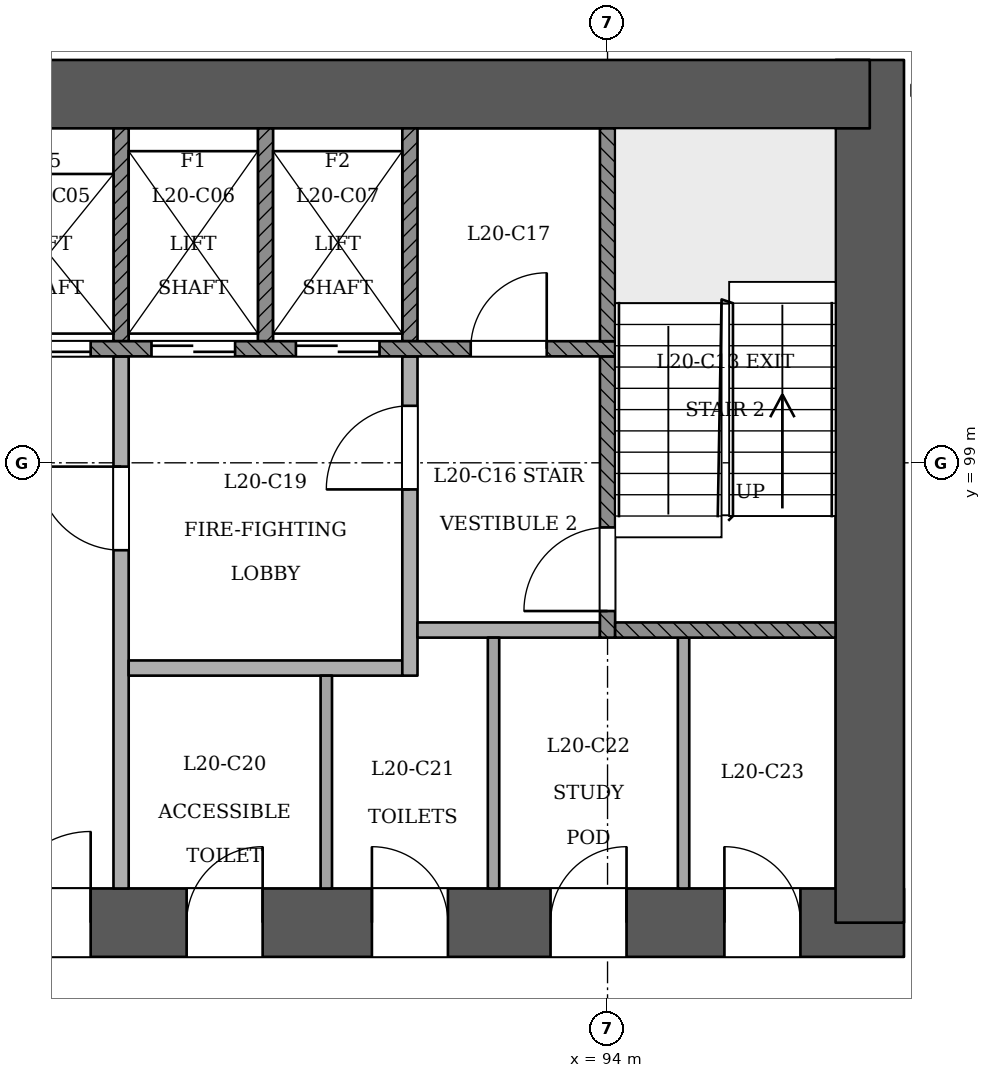
"""IFC4 building model, lengths in metres.
Left out: names, types, materials, properties, quantities, classifications, styles, units other than length and angle.
Written with IfcOpenShell. Run it as: python <this file> out.ifc"""

import sys

from ifc_helpers import new_model, si_unit, direction, frame, frame_2d, origin, place, context, subcontext, project, spatial, rectangle, extrude, element, fill, save


model = new_model("IFC4")
c1 = context("Model", 3, precision=1e-05, world=origin(), true_north=direction((0.0, 1.0)))
c2 = subcontext(c1, "Body", "Model", "MODEL_VIEW")
j1 = project(units=[si_unit("LENGTHUNIT", "METRE"), si_unit("PLANEANGLEUNIT", "RADIAN")], contexts=[c1])
p1 = place(None, origin())
s1 = spatial("IfcSite", under=j1, at=p1, CompositionType="ELEMENT")
p2 = place(p1, origin())
s2 = spatial("IfcBuilding", under=s1, at=p2, CompositionType="ELEMENT")
p3 = place(p2, frame((0.0, 0.0, 81.0)))
s3 = spatial("IfcBuildingStorey", under=s2, at=p3, CompositionType="ELEMENT", Elevation=81.0)
p4 = place(p3, frame((72.55, 92.95, 0.0), z_axis=(0.0, 0.0, 1.0), x_axis=(1.0, 0.0, 0.0)))
e1 = element("IfcWall", 1, at=p4, inside=s3, PredefinedType="SHEAR", context=c2, shape_type="SweptSolid", body=[
    extrude(rectangle(XDim=25.35, YDim=0.9, at=frame_2d((12.675, 0.0))), origin(), (0.0, 0.0, 1.0), 3.6),
])
p5 = place(p4, frame((1.25, 0.0, 0.0)))
e2 = element("IfcOpeningElement", 2, at=p5, cuts=e1, PredefinedType="OPENING", context=c2, shape_type="SweptSolid", body=[
    extrude(rectangle(XDim=1.2, YDim=2.1, at=frame_2d((0.6, 1.05))), frame((0.0, 0.46, 0.0), z_axis=(0.0, -1.0, 0.0), x_axis=(1.0, 0.0, 0.0)), (0.0, 0.0, 1.0), 0.921),
])
p6 = place(p4, frame((3.45, 0.0, 0.0)))
e3 = element("IfcOpeningElement", 3, at=p6, cuts=e1, PredefinedType="OPENING", context=c2, shape_type="SweptSolid", body=[
    extrude(rectangle(XDim=1.2, YDim=2.1, at=frame_2d((0.6, 1.05))), frame((0.0, 0.46, 0.0), z_axis=(0.0, -1.0, 0.0), x_axis=(1.0, 0.0, 0.0)), (0.0, 0.0, 1.0), 0.921),
])
p7 = place(p4, frame((13.45, 0.0, 0.0)))
e4 = element("IfcOpeningElement", 4, at=p7, cuts=e1, PredefinedType="OPENING", context=c2, shape_type="SweptSolid", body=[
    extrude(rectangle(XDim=1.2, YDim=2.1, at=frame_2d((0.6, 1.05))), frame((0.0, 0.46, 0.0), z_axis=(0.0, -1.0, 0.0), x_axis=(1.0, 0.0, 0.0)), (0.0, 0.0, 1.0), 0.921),
])
p8 = place(p4, frame((15.913, 0.0, 0.0)))
e5 = element("IfcOpeningElement", 5, at=p8, cuts=e1, PredefinedType="OPENING", context=c2, shape_type="SweptSolid", body=[
    extrude(rectangle(XDim=1.0, YDim=2.1, at=frame_2d((0.5, 1.05))), frame((0.0, 0.46, 0.0), z_axis=(0.0, -1.0, 0.0), x_axis=(1.0, 0.0, 0.0)), (0.0, 0.0, 1.0), 0.921),
])
p9 = place(p4, frame((18.35, 0.0, 0.0)))
e6 = element("IfcOpeningElement", 6, at=p9, cuts=e1, PredefinedType="OPENING", context=c2, shape_type="SweptSolid", body=[
    extrude(rectangle(XDim=1.0, YDim=2.1, at=frame_2d((0.5, 1.05))), frame((0.0, 0.46, 0.0), z_axis=(0.0, -1.0, 0.0), x_axis=(1.0, 0.0, 0.0)), (0.0, 0.0, 1.0), 0.921),
])
p10 = place(p4, frame((20.7, 0.0, 0.0)))
e7 = element("IfcOpeningElement", 7, at=p10, cuts=e1, PredefinedType="OPENING", context=c2, shape_type="SweptSolid", body=[
    extrude(rectangle(XDim=1.0, YDim=2.1, at=frame_2d((0.5, 1.05))), frame((0.0, 0.46, 0.0), z_axis=(0.0, -1.0, 0.0), x_axis=(1.0, 0.0, 0.0)), (0.0, 0.0, 1.0), 0.921),
])
p11 = place(p4, frame((22.988, 0.0, 0.0)))
e8 = element("IfcOpeningElement", 8, at=p11, cuts=e1, PredefinedType="OPENING", context=c2, shape_type="SweptSolid", body=[
    extrude(rectangle(XDim=1.0, YDim=2.1, at=frame_2d((0.5, 1.05))), frame((0.0, 0.46, 0.0), z_axis=(0.0, -1.0, 0.0), x_axis=(1.0, 0.0, 0.0)), (0.0, 0.0, 1.0), 0.921),
])
p12 = place(p3, frame((97.45, 92.95, 0.0), z_axis=(0.0, 0.0, 1.0), x_axis=(0.0, 1.0, 0.0)))
e9 = element("IfcWall", 9, at=p12, inside=s3, PredefinedType="SHEAR", context=c2, shape_type="SweptSolid", body=[
    extrude(rectangle(XDim=11.35, YDim=0.9, at=frame_2d((5.675, 0.0))), origin(), (0.0, 0.0, 1.0), 3.6),
])
p13 = place(p3, frame((97.45, 103.85, 0.0), z_axis=(0.0, 0.0, 1.0), x_axis=(-1.0, 0.0, 0.0)))
e10 = element("IfcWall", 10, at=p13, inside=s3, PredefinedType="SHEAR", context=c2, shape_type="SweptSolid", body=[
    extrude(rectangle(XDim=25.35, YDim=0.9, at=frame_2d((12.675, 0.0))), origin(), (0.0, 0.0, 1.0), 3.6),
])
p14 = place(p3, frame((85.67, 60.317, 0.0), z_axis=(0.0, 0.0, 1.0), x_axis=(0.499998839017, 0.866026074077, 0.0)))
e11 = element("IfcWall", 11, at=p14, inside=s3, PredefinedType="PARTITIONING", context=c2, shape_type="SweptSolid", body=[
    extrude(rectangle(XDim=41.239, YDim=0.15, at=frame_2d((20.62, 0.0))), origin(), (0.0, 0.0, 1.0), 2.7),
])
p15 = place(p14, frame((3.246, 0.0, 0.0)))
e12 = element("IfcOpeningElement", 12, at=p15, cuts=e11, PredefinedType="OPENING", context=c2, shape_type="SweptSolid", body=[
    extrude(rectangle(XDim=1.2, YDim=2.1, at=frame_2d((0.6, 1.05))), frame((0.0, 0.085, 0.0), z_axis=(0.0, -1.0, 0.0), x_axis=(1.0, 0.0, 0.0)), (0.0, 0.0, 1.0), 0.171),
])
p16 = place(p14, frame((10.771, 0.0, 0.0)))
e13 = element("IfcOpeningElement", 13, at=p16, cuts=e11, PredefinedType="OPENING", context=c2, shape_type="SweptSolid", body=[
    extrude(rectangle(XDim=1.0, YDim=2.1, at=frame_2d((0.5, 1.05))), frame((0.0, 0.085, 0.0), z_axis=(0.0, -1.0, 0.0), x_axis=(1.0, 0.0, 0.0)), (0.0, 0.0, 1.0), 0.171),
])
p17 = place(p14, frame((14.125, 0.0, 0.0)))
e14 = element("IfcOpeningElement", 14, at=p17, cuts=e11, PredefinedType="OPENING", context=c2, shape_type="SweptSolid", body=[
    extrude(rectangle(XDim=1.0, YDim=2.1, at=frame_2d((0.5, 1.05))), frame((0.0, 0.085, 0.0), z_axis=(0.0, -1.0, 0.0), x_axis=(1.0, 0.0, 0.0)), (0.0, 0.0, 1.0), 0.171),
])
p18 = place(p14, frame((19.771, 0.0, 0.0)))
e15 = element("IfcOpeningElement", 15, at=p18, cuts=e11, PredefinedType="OPENING", context=c2, shape_type="SweptSolid", body=[
    extrude(rectangle(XDim=1.0, YDim=2.1, at=frame_2d((0.5, 1.05))), frame((0.0, 0.085, 0.0), z_axis=(0.0, -1.0, 0.0), x_axis=(1.0, 0.0, 0.0)), (0.0, 0.0, 1.0), 0.171),
])
p19 = place(p14, frame((21.98, 0.0, 0.0)))
e16 = element("IfcOpeningElement", 16, at=p19, cuts=e11, PredefinedType="OPENING", context=c2, shape_type="SweptSolid", body=[
    extrude(rectangle(XDim=1.0, YDim=2.1, at=frame_2d((0.5, 1.05))), frame((0.0, 0.085, 0.0), z_axis=(0.0, -1.0, 0.0), x_axis=(1.0, 0.0, 0.0)), (0.0, 0.0, 1.0), 0.171),
])
p20 = place(p14, frame((28.655, 0.0, 0.0)))
e17 = element("IfcOpeningElement", 17, at=p20, cuts=e11, PredefinedType="OPENING", context=c2, shape_type="SweptSolid", body=[
    extrude(rectangle(XDim=1.0, YDim=2.1, at=frame_2d((0.5, 1.05))), frame((0.0, 0.085, 0.0), z_axis=(0.0, -1.0, 0.0), x_axis=(1.0, 0.0, 0.0)), (0.0, 0.0, 1.0), 0.171),
])
p21 = place(p14, frame((35.382, 0.0, 0.0)))
e18 = element("IfcOpeningElement", 18, at=p21, cuts=e11, PredefinedType="OPENING", context=c2, shape_type="SweptSolid", body=[
    extrude(rectangle(XDim=1.2, YDim=2.1, at=frame_2d((0.6, 1.05))), frame((0.0, 0.085, 0.0), z_axis=(0.0, -1.0, 0.0), x_axis=(1.0, 0.0, 0.0)), (0.0, 0.0, 1.0), 0.171),
])
p22 = place(p3, frame((87.6, 93.4, 0.0), z_axis=(0.0, 0.0, 1.0), x_axis=(0.0, 1.0, 0.0)))
e19 = element("IfcWall", 19, at=p22, inside=s3, PredefinedType="PARTITIONING", context=c2, shape_type="SweptSolid", body=[
    extrude(rectangle(XDim=7.0, YDim=0.2, at=frame_2d((3.5, 0.0))), origin(), (0.0, 0.0, 1.0), 3.1),
])
p23 = place(p22, frame((4.45, 0.0, 0.0)))
e20 = element("IfcOpeningElement", 20, at=p23, cuts=e19, PredefinedType="OPENING", context=c2, shape_type="SweptSolid", body=[
    extrude(rectangle(XDim=1.1, YDim=2.1, at=frame_2d((0.55, 1.05))), frame((0.0, 0.11, 0.0), z_axis=(0.0, -1.0, 0.0), x_axis=(1.0, 0.0, 0.0)), (0.0, 0.0, 1.0), 0.221),
])
p24 = place(p3, frame((90.3, 93.4, 0.0), z_axis=(0.0, 0.0, 1.0), x_axis=(0.0, 1.0, 0.0)))
e21 = element("IfcWall", 21, at=p24, inside=s3, PredefinedType="PARTITIONING", context=c2, shape_type="SweptSolid", body=[
    extrude(rectangle(XDim=2.8, YDim=0.15, at=frame_2d((1.4, 0.0))), origin(), (0.0, 0.0, 1.0), 3.1),
])
for number, where, z_axis, x_axis in (
    (22, (92.5, 93.4, 0.0), (0.0, 0.0, 1.0), (0.0, 1.0, 0.0)),
    (23, (95.0, 93.4, 0.0), (0.0, 0.0, 1.0), (0.0, 1.0, 0.0)),
):
    element("IfcWall", number, at=place(p3, frame(where, z_axis=z_axis, x_axis=x_axis)), inside=s3, PredefinedType="PARTITIONING", context=c2, shape_type="SweptSolid", body=[
        extrude(rectangle(XDim=3.3, YDim=0.15, at=frame_2d((1.65, 0.0))), origin(), (0.0, 0.0, 1.0), 3.1),
    ])
p25 = place(p3, frame((87.7, 96.3, 0.0), z_axis=(0.0, 0.0, 1.0), x_axis=(1.0, 0.0, 0.0)))
e24 = element("IfcWall", 24, at=p25, inside=s3, PredefinedType="PARTITIONING", context=c2, shape_type="SweptSolid", body=[
    extrude(rectangle(XDim=3.6, YDim=0.2, at=frame_2d((1.8, 0.0))), origin(), (0.0, 0.0, 1.0), 3.1),
])
p26 = place(p3, frame((91.4, 96.2, 0.0), z_axis=(0.0, 0.0, 1.0), x_axis=(0.0, 1.0, 0.0)))
e25 = element("IfcWall", 25, at=p26, inside=s3, PredefinedType="PARTITIONING", context=c2, shape_type="SweptSolid", body=[
    extrude(rectangle(XDim=4.2, YDim=0.2, at=frame_2d((2.1, 0.0))), origin(), (0.0, 0.0, 1.0), 3.1),
])
p27 = place(p26, frame((2.45, 0.0, 0.0)))
e26 = element("IfcOpeningElement", 26, at=p27, cuts=e25, PredefinedType="OPENING", context=c2, shape_type="SweptSolid", body=[
    extrude(rectangle(XDim=1.1, YDim=2.1, at=frame_2d((0.55, 1.05))), frame((0.0, 0.11, 0.0), z_axis=(0.0, -1.0, 0.0), x_axis=(1.0, 0.0, 0.0)), (0.0, 0.0, 1.0), 0.221),
])
p28 = place(p3, frame((91.5, 96.8, 0.0), z_axis=(0.0, 0.0, 1.0), x_axis=(1.0, 0.0, 0.0)))
e27 = element("IfcWall", 27, at=p28, inside=s3, PredefinedType="PARTITIONING", context=c2, shape_type="SweptSolid", body=[
    extrude(rectangle(XDim=2.4, YDim=0.2, at=frame_2d((1.2, 0.0))), origin(), (0.0, 0.0, 1.0), 3.1),
])
p29 = place(p3, frame((94.0, 96.7, 0.0), z_axis=(0.0, 0.0, 1.0), x_axis=(0.0, 1.0, 0.0)))
e28 = element("IfcWall", 28, at=p29, inside=s3, PredefinedType="SOLIDWALL", context=c2, shape_type="SweptSolid", body=[
    extrude(rectangle(XDim=3.7, YDim=0.2, at=frame_2d((1.85, 0.0))), origin(), (0.0, 0.0, 1.0), 3.1),
])
p30 = place(p29, frame((0.35, 0.0, 0.0)))
e29 = element("IfcOpeningElement", 29, at=p30, cuts=e28, PredefinedType="OPENING", context=c2, shape_type="SweptSolid", body=[
    extrude(rectangle(XDim=1.1, YDim=2.1, at=frame_2d((0.55, 1.05))), frame((0.0, 0.11, 0.0), z_axis=(0.0, -1.0, 0.0), x_axis=(1.0, 0.0, 0.0)), (0.0, 0.0, 1.0), 0.221),
])
p31 = place(p3, frame((94.1, 96.8, 0.0), z_axis=(0.0, 0.0, 1.0), x_axis=(1.0, 0.0, 0.0)))
e30 = element("IfcWall", 30, at=p31, inside=s3, PredefinedType="SOLIDWALL", context=c2, shape_type="SweptSolid", body=[
    extrude(rectangle(XDim=2.9, YDim=0.2, at=frame_2d((1.45, 0.0))), origin(), (0.0, 0.0, 1.0), 3.1),
])
p32 = place(p3, frame((75.9, 100.5, 0.0), z_axis=(0.0, 0.0, 1.0), x_axis=(1.0, 0.0, 0.0)))
e31 = element("IfcWall", 31, at=p32, inside=s3, PredefinedType="SOLIDWALL", context=c2, shape_type="SweptSolid", body=[
    extrude(rectangle(XDim=18.2, YDim=0.2, at=frame_2d((9.1, 0.0))), origin(), (0.0, 0.0, 1.0), 3.1),
])
p33 = place(p32, frame((2.6, 0.0, 0.0)))
e32 = element("IfcOpeningElement", 32, at=p33, cuts=e31, PredefinedType="OPENING", context=c2, shape_type="SweptSolid", body=[
    extrude(rectangle(XDim=1.1, YDim=2.1, at=frame_2d((0.55, 1.05))), frame((0.0, 0.11, 0.0), z_axis=(0.0, -1.0, 0.0), x_axis=(1.0, 0.0, 0.0)), (0.0, 0.0, 1.0), 0.221),
])
p34 = place(p32, frame((4.5, 0.0, 0.0)))
e33 = element("IfcOpeningElement", 33, at=p34, cuts=e31, PredefinedType="OPENING", context=c2, shape_type="SweptSolid", body=[
    extrude(rectangle(XDim=1.1, YDim=2.1, at=frame_2d((0.55, 1.05))), frame((0.0, 0.11, 0.0), z_axis=(0.0, -1.0, 0.0), x_axis=(1.0, 0.0, 0.0)), (0.0, 0.0, 1.0), 0.221),
])
p35 = place(p32, frame((6.4, 0.0, 0.0)))
e34 = element("IfcOpeningElement", 34, at=p35, cuts=e31, PredefinedType="OPENING", context=c2, shape_type="SweptSolid", body=[
    extrude(rectangle(XDim=1.1, YDim=2.1, at=frame_2d((0.55, 1.05))), frame((0.0, 0.11, 0.0), z_axis=(0.0, -1.0, 0.0), x_axis=(1.0, 0.0, 0.0)), (0.0, 0.0, 1.0), 0.221),
])
p36 = place(p32, frame((8.3, 0.0, 0.0)))
e35 = element("IfcOpeningElement", 35, at=p36, cuts=e31, PredefinedType="OPENING", context=c2, shape_type="SweptSolid", body=[
    extrude(rectangle(XDim=1.1, YDim=2.1, at=frame_2d((0.55, 1.05))), frame((0.0, 0.11, 0.0), z_axis=(0.0, -1.0, 0.0), x_axis=(1.0, 0.0, 0.0)), (0.0, 0.0, 1.0), 0.221),
])
p37 = place(p32, frame((10.2, 0.0, 0.0)))
e36 = element("IfcOpeningElement", 36, at=p37, cuts=e31, PredefinedType="OPENING", context=c2, shape_type="SweptSolid", body=[
    extrude(rectangle(XDim=1.1, YDim=2.1, at=frame_2d((0.55, 1.05))), frame((0.0, 0.11, 0.0), z_axis=(0.0, -1.0, 0.0), x_axis=(1.0, 0.0, 0.0)), (0.0, 0.0, 1.0), 0.221),
])
p38 = place(p32, frame((12.1, 0.0, 0.0)))
e37 = element("IfcOpeningElement", 37, at=p38, cuts=e31, PredefinedType="OPENING", context=c2, shape_type="SweptSolid", body=[
    extrude(rectangle(XDim=1.1, YDim=2.1, at=frame_2d((0.55, 1.05))), frame((0.0, 0.11, 0.0), z_axis=(0.0, -1.0, 0.0), x_axis=(1.0, 0.0, 0.0)), (0.0, 0.0, 1.0), 0.221),
])
p39 = place(p32, frame((14.0, 0.0, 0.0)))
e38 = element("IfcOpeningElement", 38, at=p39, cuts=e31, PredefinedType="OPENING", context=c2, shape_type="SweptSolid", body=[
    extrude(rectangle(XDim=1.1, YDim=2.1, at=frame_2d((0.55, 1.05))), frame((0.0, 0.11, 0.0), z_axis=(0.0, -1.0, 0.0), x_axis=(1.0, 0.0, 0.0)), (0.0, 0.0, 1.0), 0.221),
])
p40 = place(p32, frame((0.65, 0.0, 0.0)))
e39 = element("IfcOpeningElement", 39, at=p40, cuts=e31, PredefinedType="OPENING", context=c2, shape_type="SweptSolid", body=[
    extrude(rectangle(XDim=1.0, YDim=2.1, at=frame_2d((0.5, 1.05))), frame((0.0, 0.11, 0.0), z_axis=(0.0, -1.0, 0.0), x_axis=(1.0, 0.0, 0.0)), (0.0, 0.0, 1.0), 0.221),
])
p41 = place(p32, frame((16.3, 0.0, 0.0)))
e40 = element("IfcOpeningElement", 40, at=p41, cuts=e31, PredefinedType="OPENING", context=c2, shape_type="SweptSolid", body=[
    extrude(rectangle(XDim=1.0, YDim=2.1, at=frame_2d((0.5, 1.05))), frame((0.0, 0.11, 0.0), z_axis=(0.0, -1.0, 0.0), x_axis=(1.0, 0.0, 0.0)), (0.0, 0.0, 1.0), 0.221),
])
for number, where, z_axis, x_axis in (
    (41, (87.6, 100.6, 0.0), (0.0, 0.0, 1.0), (0.0, 1.0, 0.0)),
    (42, (89.5, 100.6, 0.0), (0.0, 0.0, 1.0), (0.0, 1.0, 0.0)),
    (43, (91.4, 100.6, 0.0), (0.0, 0.0, 1.0), (0.0, 1.0, 0.0)),
    (44, (94.0, 100.6, 0.0), (0.0, 0.0, 1.0), (0.0, 1.0, 0.0)),
):
    element("IfcWall", number, at=place(p3, frame(where, z_axis=z_axis, x_axis=x_axis)), inside=s3, PredefinedType="SOLIDWALL", context=c2, shape_type="SweptSolid", body=[
        extrude(rectangle(XDim=2.8, YDim=0.2, at=frame_2d((1.4, 0.0))), origin(), (0.0, 0.0, 1.0), 3.1),
    ])
p42 = place(p37, origin())
e45 = element("IfcDoor", 45, at=p42, inside=s3, OperationType="SLIDING_TO_RIGHT", PredefinedType="NOTDEFINED", context=c2, shape_type="SweptSolid", body=[
    extrude(rectangle(XDim=1.1, YDim=2.1, at=frame_2d((0.55, 1.05))), frame((0.0, 0.025, 0.0), z_axis=(0.0, -1.0, 0.0), x_axis=(1.0, 0.0, 0.0)), (0.0, 0.0, 1.0), 0.05),
])
fill(e36, e45)
p43 = place(p38, origin())
e46 = element("IfcDoor", 46, at=p43, inside=s3, OperationType="SLIDING_TO_RIGHT", PredefinedType="NOTDEFINED", context=c2, shape_type="SweptSolid", body=[
    extrude(rectangle(XDim=1.1, YDim=2.1, at=frame_2d((0.55, 1.05))), frame((0.0, 0.025, 0.0), z_axis=(0.0, -1.0, 0.0), x_axis=(1.0, 0.0, 0.0)), (0.0, 0.0, 1.0), 0.05),
])
fill(e37, e46)
p44 = place(p39, origin())
e47 = element("IfcDoor", 47, at=p44, inside=s3, OperationType="SLIDING_TO_LEFT", PredefinedType="NOTDEFINED", context=c2, shape_type="SweptSolid", body=[
    extrude(rectangle(XDim=1.1, YDim=2.1, at=frame_2d((0.55, 1.05))), frame((0.0, 0.025, 0.0), z_axis=(0.0, -1.0, 0.0), x_axis=(1.0, 0.0, 0.0)), (0.0, 0.0, 1.0), 0.05),
])
fill(e38, e47)
p45 = place(p30, origin())
e48 = element("IfcDoor", 48, at=p45, inside=s3, OperationType="SINGLE_SWING_LEFT", PredefinedType="NOTDEFINED", context=c2, shape_type="SweptSolid", body=[
    extrude(rectangle(XDim=1.1, YDim=2.1, at=frame_2d((0.55, 1.05))), frame((0.0, 0.025, 0.0), z_axis=(0.0, -1.0, 0.0), x_axis=(1.0, 0.0, 0.0)), (0.0, 0.0, 1.0), 0.05),
])
fill(e29, e48)
p46 = place(p23, origin())
e49 = element("IfcDoor", 49, at=p46, inside=s3, OperationType="SINGLE_SWING_RIGHT", PredefinedType="NOTDEFINED", context=c2, shape_type="SweptSolid", body=[
    extrude(rectangle(XDim=1.1, YDim=2.1, at=frame_2d((0.55, 1.05))), frame((0.0, 0.025, 0.0), z_axis=(0.0, -1.0, 0.0), x_axis=(1.0, 0.0, 0.0)), (0.0, 0.0, 1.0), 0.05),
])
fill(e20, e49)
p47 = place(p27, origin())
e50 = element("IfcDoor", 50, at=p47, inside=s3, OperationType="SINGLE_SWING_LEFT", PredefinedType="NOTDEFINED", context=c2, shape_type="SweptSolid", body=[
    extrude(rectangle(XDim=1.1, YDim=2.1, at=frame_2d((0.55, 1.05))), frame((0.0, 0.025, 0.0), z_axis=(0.0, -1.0, 0.0), x_axis=(1.0, 0.0, 0.0)), (0.0, 0.0, 1.0), 0.05),
])
fill(e26, e50)
p48 = place(p7, origin())
e51 = element("IfcDoor", 51, at=p48, inside=s3, OperationType="SINGLE_SWING_RIGHT", PredefinedType="NOTDEFINED", context=c2, shape_type="SweptSolid", body=[
    extrude(rectangle(XDim=1.2, YDim=2.1, at=frame_2d((0.6, 1.05))), frame((0.0, 0.025, 0.0), z_axis=(0.0, -1.0, 0.0), x_axis=(1.0, 0.0, 0.0)), (0.0, 0.0, 1.0), 0.05),
])
fill(e4, e51)
p49 = place(p41, origin())
e52 = element("IfcDoor", 52, at=p49, inside=s3, OperationType="SINGLE_SWING_RIGHT", PredefinedType="NOTDEFINED", context=c2, shape_type="SweptSolid", body=[
    extrude(rectangle(XDim=1.0, YDim=2.1, at=frame_2d((0.5, 1.05))), frame((0.0, 0.025, 0.0), z_axis=(0.0, -1.0, 0.0), x_axis=(1.0, 0.0, 0.0)), (0.0, 0.0, 1.0), 0.05),
])
fill(e40, e52)
p50 = place(p8, origin())
e53 = element("IfcDoor", 53, at=p50, inside=s3, OperationType="SINGLE_SWING_RIGHT", PredefinedType="NOTDEFINED", context=c2, shape_type="SweptSolid", body=[
    extrude(rectangle(XDim=1.0, YDim=2.1, at=frame_2d((0.5, 1.05))), frame((0.0, 0.025, 0.0), z_axis=(0.0, -1.0, 0.0), x_axis=(1.0, 0.0, 0.0)), (0.0, 0.0, 1.0), 0.05),
])
fill(e5, e53)
p51 = place(p9, origin())
e54 = element("IfcDoor", 54, at=p51, inside=s3, OperationType="SINGLE_SWING_LEFT", PredefinedType="NOTDEFINED", context=c2, shape_type="SweptSolid", body=[
    extrude(rectangle(XDim=1.0, YDim=2.1, at=frame_2d((0.5, 1.05))), frame((0.0, 0.025, 0.0), z_axis=(0.0, -1.0, 0.0), x_axis=(1.0, 0.0, 0.0)), (0.0, 0.0, 1.0), 0.05),
])
fill(e6, e54)
p52 = place(p10, origin())
e55 = element("IfcDoor", 55, at=p52, inside=s3, OperationType="SINGLE_SWING_RIGHT", PredefinedType="NOTDEFINED", context=c2, shape_type="SweptSolid", body=[
    extrude(rectangle(XDim=1.0, YDim=2.1, at=frame_2d((0.5, 1.05))), frame((0.0, 0.025, 0.0), z_axis=(0.0, -1.0, 0.0), x_axis=(1.0, 0.0, 0.0)), (0.0, 0.0, 1.0), 0.05),
])
fill(e7, e55)
p53 = place(p11, origin())
e56 = element("IfcDoor", 56, at=p53, inside=s3, OperationType="SINGLE_SWING_LEFT", PredefinedType="NOTDEFINED", context=c2, shape_type="SweptSolid", body=[
    extrude(rectangle(XDim=1.0, YDim=2.1, at=frame_2d((0.5, 1.05))), frame((0.0, 0.025, 0.0), z_axis=(0.0, -1.0, 0.0), x_axis=(1.0, 0.0, 0.0)), (0.0, 0.0, 1.0), 0.05),
])
fill(e8, e56)
save(model, sys.argv[1])
